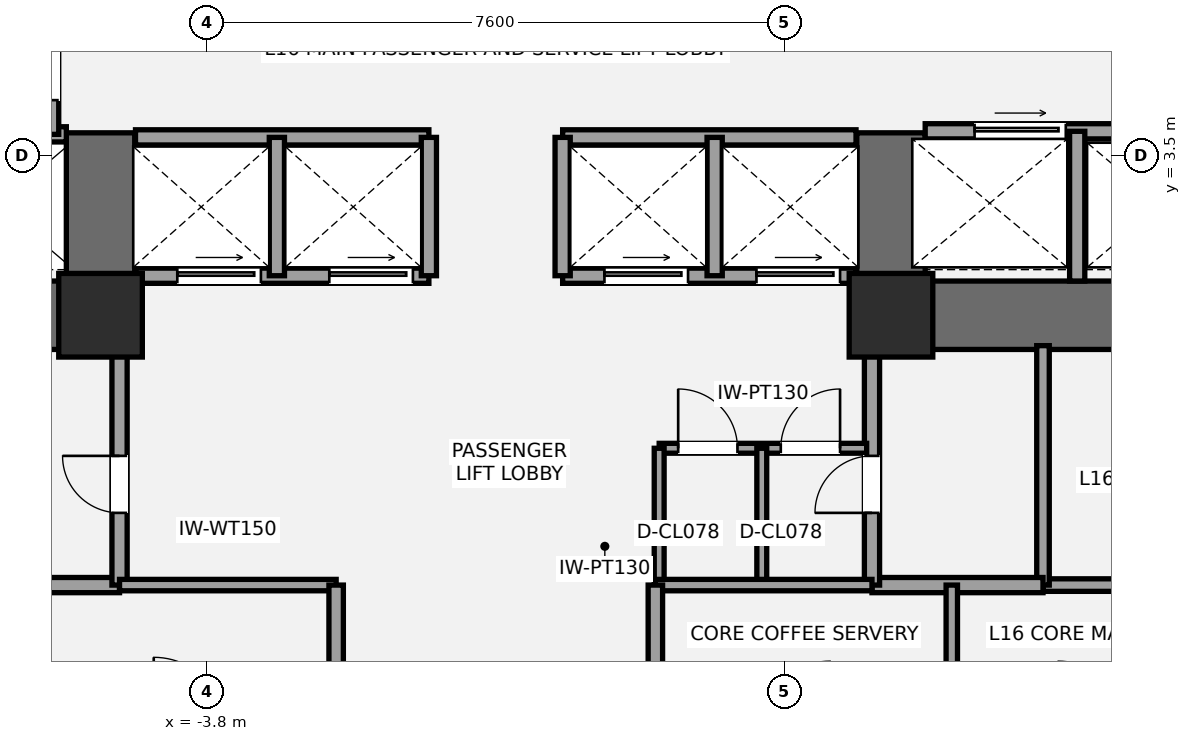
"""IFC4 building model, lengths in metres.
Left out: names, types, materials, properties, quantities, classifications, styles, units other than length and angle.
Written with IfcOpenShell. Run it as: python <this file> out.ifc"""

import sys

from ifc_helpers import new_model, si_unit, direction, frame, frame_2d, origin, origin_2d, place, context, subcontext, project, spatial, rectangle, extrude, element, fill, save


model = new_model("IFC4")
c1 = context("Model", 3, precision=1e-05, world=origin(), true_north=direction((0.0, 1.0)))
c2 = subcontext(c1, "Body", "Model", "MODEL_VIEW")
j1 = project(units=[si_unit("LENGTHUNIT", "METRE"), si_unit("PLANEANGLEUNIT", "RADIAN")], contexts=[c1])
p1 = place(None, origin())
s1 = spatial("IfcSite", under=j1, at=p1, CompositionType="ELEMENT")
p2 = place(p1, origin())
s2 = spatial("IfcBuilding", under=s1, at=p2, CompositionType="ELEMENT")
p3 = place(p2, frame((0.0, 0.0, 63.0)))
s3 = spatial("IfcBuildingStorey", under=s2, at=p3, CompositionType="ELEMENT", Elevation=63.0)
p4 = place(p3, frame((-4.75, 1.4, 0.0), z_axis=(0.0, 0.0, 1.0), x_axis=(-1.0, 0.0, 0.0)))
e1 = element("IfcWall", 1, at=p4, inside=s3, PredefinedType="SHEAR", context=c2, shape_type="SweptSolid", body=[
    extrude(rectangle(XDim=9.3, YDim=0.9, at=frame_2d((4.65, 0.0))), origin(), (0.0, 0.0, 1.0), 3.6),
])
p5 = place(p4, frame((5.55, 0.0, 0.0)))
e2 = element("IfcOpeningElement", 2, at=p5, cuts=e1, PredefinedType="OPENING", context=c2, shape_type="SweptSolid", body=[
    extrude(rectangle(XDim=1.05, YDim=2.15, at=frame_2d((0.525, 1.075))), frame((0.0, 0.46, 0.0), z_axis=(0.0, -1.0, 0.0), x_axis=(1.0, 0.0, 0.0)), (0.0, 0.0, 1.0), 0.92),
])
p6 = place(p4, frame((3.88, 0.0, 0.0)))
e3 = element("IfcOpeningElement", 3, at=p6, cuts=e1, PredefinedType="OPENING", context=c2, shape_type="SweptSolid", body=[
    extrude(rectangle(XDim=1.1, YDim=2.2, at=frame_2d((0.55, 1.1))), frame((0.0, 0.46, 0.0), z_axis=(0.0, -1.0, 0.0), x_axis=(1.0, 0.0, 0.0)), (0.0, 0.0, 1.0), 0.92),
])
p7 = place(p3, frame((-5.2, 0.95, 0.0), z_axis=(0.0, 0.0, 1.0), x_axis=(0.0, 1.0, 0.0)))
e4 = element("IfcWall", 4, at=p7, inside=s3, PredefinedType="SHEAR", context=c2, shape_type="SweptSolid", body=[
    extrude(rectangle(XDim=2.85, YDim=0.9, at=frame_2d((1.425, 0.0))), origin(), (0.0, 0.0, 1.0), 3.6),
])
p8 = place(p3, frame((14.05, 1.4, 0.0), z_axis=(0.0, 0.0, 1.0), x_axis=(-1.0, 0.0, 0.0)))
e5 = element("IfcWall", 5, at=p8, inside=s3, PredefinedType="SHEAR", context=c2, shape_type="SweptSolid", body=[
    extrude(rectangle(XDim=9.3, YDim=0.9, at=frame_2d((4.65, 0.0))), origin(), (0.0, 0.0, 1.0), 3.6),
])
p9 = place(p8, frame((2.7, 0.0, 0.0)))
e6 = element("IfcOpeningElement", 6, at=p9, cuts=e5, PredefinedType="OPENING", context=c2, shape_type="SweptSolid", body=[
    extrude(rectangle(XDim=1.05, YDim=2.15, at=frame_2d((0.525, 1.075))), frame((0.0, 0.46, 0.0), z_axis=(0.0, -1.0, 0.0), x_axis=(1.0, 0.0, 0.0)), (0.0, 0.0, 1.0), 0.92),
])
p10 = place(p8, frame((4.7, 0.0, 0.0)))
e7 = element("IfcOpeningElement", 7, at=p10, cuts=e5, PredefinedType="OPENING", context=c2, shape_type="SweptSolid", body=[
    extrude(rectangle(XDim=1.1, YDim=2.2, at=frame_2d((0.55, 1.1))), frame((0.0, 0.46, 0.0), z_axis=(0.0, -1.0, 0.0), x_axis=(1.0, 0.0, 0.0)), (0.0, 0.0, 1.0), 0.92),
])
p11 = place(p3, frame((5.2, 0.95, 0.0), z_axis=(0.0, 0.0, 1.0), x_axis=(0.0, 1.0, 0.0)))
e8 = element("IfcWall", 8, at=p11, inside=s3, PredefinedType="SHEAR", context=c2, shape_type="SweptSolid", body=[
    extrude(rectangle(XDim=2.85, YDim=0.9, at=frame_2d((1.425, 0.0))), origin(), (0.0, 0.0, 1.0), 3.6),
])
for number, where, z_axis, x_axis in (
    (9, (-5.2, 1.4, 0.0), (0.0, 0.0, 1.0), (1.0, 0.0, 0.0)),
    (10, (5.2, 1.4, 0.0), (0.0, 0.0, 1.0), (1.0, 0.0, 0.0)),
):
    element("IfcColumn", number, at=place(p3, frame(where, z_axis=z_axis, x_axis=x_axis)), inside=s3, PredefinedType="COLUMN", context=c2, shape_type="SweptSolid", body=[
        extrude(rectangle(XDim=1.1, YDim=1.1, at=origin_2d()), origin(), (0.0, 0.0, 1.0), 3.6),
    ])
p12 = place(p3, frame((-7.2, -2.15, 0.0), z_axis=(0.0, 0.0, 1.0), x_axis=(1.0, 0.0, 0.0)))
e11 = element("IfcWall", 11, at=p12, inside=s3, PredefinedType="SOLIDWALL", context=c2, shape_type="SweptSolid", body=[
    extrude(rectangle(XDim=2.25, YDim=0.2, at=frame_2d((1.125, 0.0))), origin(), (0.0, 0.0, 1.0), 3.4),
])
p13 = place(p3, frame((-4.95, -2.15, 0.0), z_axis=(0.0, 0.0, 1.0), x_axis=(0.0, 1.0, 0.0)))
e12 = element("IfcWall", 12, at=p13, inside=s3, PredefinedType="SOLIDWALL", context=c2, shape_type="SweptSolid", body=[
    extrude(rectangle(XDim=3.15, YDim=0.2, at=frame_2d((1.575, 0.0))), origin(), (0.0, 0.0, 1.0), 2.853),
])
p14 = place(p13, frame((0.95, 0.0, 0.0)))
e13 = element("IfcOpeningElement", 13, at=p14, cuts=e12, PredefinedType="OPENING", context=c2, shape_type="SweptSolid", body=[
    extrude(rectangle(XDim=0.75, YDim=2.1, at=frame_2d((0.375, 1.05))), frame((0.0, 0.11, 0.0), z_axis=(0.0, -1.0, 0.0), x_axis=(1.0, 0.0, 0.0)), (0.0, 0.0, 1.0), 0.22),
])
p15 = place(p3, frame((7.2, -2.15, 0.0), z_axis=(0.0, 0.0, 1.0), x_axis=(1.0, 0.0, 0.0)))
e14 = element("IfcWall", 14, at=p15, inside=s3, PredefinedType="PARTITIONING", context=c2, shape_type="SweptSolid", body=[
    extrude(rectangle(XDim=6.25, YDim=0.165, at=frame_2d((3.125, 0.0))), origin(), (0.0, 0.0, 1.0), 3.4),
])
p16 = place(p3, frame((7.2, -2.15, 0.0), z_axis=(0.0, 0.0, 1.0), x_axis=(0.0, 1.0, 0.0)))
e15 = element("IfcWall", 15, at=p16, inside=s3, PredefinedType="PARTITIONING", context=c2, shape_type="SweptSolid", body=[
    extrude(rectangle(XDim=3.15, YDim=0.165, at=frame_2d((1.575, 0.0))), origin(), (0.0, 0.0, 1.0), 2.853),
])
p17 = place(p3, frame((4.95, -2.15, 0.0), z_axis=(0.0, 0.0, 1.0), x_axis=(1.0, 0.0, 0.0)))
e16 = element("IfcWall", 16, at=p17, inside=s3, PredefinedType="SOLIDWALL", context=c2, shape_type="SweptSolid", body=[
    extrude(rectangle(XDim=2.25, YDim=0.2, at=frame_2d((1.125, 0.0))), origin(), (0.0, 0.0, 1.0), 3.4),
])
p18 = place(p3, frame((4.95, -2.15, 0.0), z_axis=(0.0, 0.0, 1.0), x_axis=(0.0, 1.0, 0.0)))
e17 = element("IfcWall", 17, at=p18, inside=s3, PredefinedType="SOLIDWALL", context=c2, shape_type="SweptSolid", body=[
    extrude(rectangle(XDim=3.15, YDim=0.2, at=frame_2d((1.575, 0.0))), origin(), (0.0, 0.0, 1.0), 2.853),
])
p19 = place(p18, frame((0.95, 0.0, 0.0)))
e18 = element("IfcOpeningElement", 18, at=p19, cuts=e17, PredefinedType="OPENING", context=c2, shape_type="SweptSolid", body=[
    extrude(rectangle(XDim=0.75, YDim=2.1, at=frame_2d((0.375, 1.05))), frame((0.0, 0.11, 0.0), z_axis=(0.0, -1.0, 0.0), x_axis=(1.0, 0.0, 0.0)), (0.0, 0.0, 1.0), 0.22),
])
p20 = place(p3, frame((2.15, -0.35, 0.0), z_axis=(0.0, 0.0, 1.0), x_axis=(1.0, 0.0, 0.0)))
e19 = element("IfcWall", 19, at=p20, inside=s3, PredefinedType="PARTITIONING", context=c2, shape_type="SweptSolid", body=[
    extrude(rectangle(XDim=2.73, YDim=0.13, at=frame_2d((1.365, 0.0))), origin(), (0.0, 0.0, 1.0), 3.4),
])
p21 = place(p20, frame((0.25, 0.0, 0.0)))
e20 = element("IfcOpeningElement", 20, at=p21, cuts=e19, PredefinedType="OPENING", context=c2, shape_type="SweptSolid", body=[
    extrude(rectangle(XDim=0.78, YDim=2.1, at=frame_2d((0.39, 1.05))), frame((0.0, 0.075, 0.0), z_axis=(0.0, -1.0, 0.0), x_axis=(1.0, 0.0, 0.0)), (0.0, 0.0, 1.0), 0.15),
])
p22 = place(p20, frame((1.6, 0.0, 0.0)))
e21 = element("IfcOpeningElement", 21, at=p22, cuts=e19, PredefinedType="OPENING", context=c2, shape_type="SweptSolid", body=[
    extrude(rectangle(XDim=0.78, YDim=2.1, at=frame_2d((0.39, 1.05))), frame((0.0, 0.075, 0.0), z_axis=(0.0, -1.0, 0.0), x_axis=(1.0, 0.0, 0.0)), (0.0, 0.0, 1.0), 0.15),
])
for number, where, z_axis, x_axis in (
    (22, (2.15, -2.15, 0.0), (0.0, 0.0, 1.0), (0.0, 1.0, 0.0)),
    (23, (3.5, -2.15, 0.0), (0.0, 0.0, 1.0), (0.0, 1.0, 0.0)),
):
    element("IfcWall", number, at=place(p3, frame(where, z_axis=z_axis, x_axis=x_axis)), inside=s3, PredefinedType="PARTITIONING", context=c2, shape_type="SweptSolid", body=[
        extrude(rectangle(XDim=1.8, YDim=0.13, at=frame_2d((0.9, 0.0))), origin(), (0.0, 0.0, 1.0), 3.4),
    ])
p23 = place(p3, frame((-9.78, 3.78, 0.0), z_axis=(0.0, 0.0, 1.0), x_axis=(1.0, 0.0, 0.0)))
e24 = element("IfcWall", 24, at=p23, inside=s3, PredefinedType="SOLIDWALL", context=c2, shape_type="SweptSolid", body=[
    extrude(rectangle(XDim=4.13, YDim=0.2, at=frame_2d((2.065, 0.0))), origin(), (0.0, 0.0, 1.0), 3.4),
])
p24 = place(p3, frame((-5.85, 3.78, 0.0), z_axis=(0.0, 0.0, 1.0), x_axis=(0.0, 1.0, 0.0)))
e25 = element("IfcWall", 25, at=p24, inside=s3, PredefinedType="SOLIDWALL", context=c2, shape_type="SweptSolid", body=[
    extrude(rectangle(XDim=1.69, YDim=0.2, at=frame_2d((0.845, 0.0))), origin(), (0.0, 0.0, 1.0), 3.4),
])
p25 = place(p24, frame((0.45, 0.0, 0.0)))
e26 = element("IfcOpeningElement", 26, at=p25, cuts=e25, PredefinedType="OPENING", context=c2, shape_type="SweptSolid", body=[
    extrude(rectangle(XDim=0.75, YDim=2.1, at=frame_2d((0.375, 1.05))), frame((0.0, 0.11, 0.0), z_axis=(0.0, -1.0, 0.0), x_axis=(1.0, 0.0, 0.0)), (0.0, 0.0, 1.0), 0.22),
])
p26 = place(p3, frame((5.65, 3.82, 0.0), z_axis=(0.0, 0.0, 1.0), x_axis=(1.0, 0.0, 0.0)))
e27 = element("IfcWall", 27, at=p26, inside=s3, PredefinedType="SOLIDWALL", context=c2, shape_type="SweptSolid", body=[
    extrude(rectangle(XDim=4.13, YDim=0.2, at=frame_2d((2.065, 0.0))), origin(), (0.0, 0.0, 1.0), 3.4),
])
p27 = place(p26, frame((0.65, 0.0, 0.0)))
e28 = element("IfcOpeningElement", 28, at=p27, cuts=e27, PredefinedType="OPENING", context=c2, shape_type="SweptSolid", body=[
    extrude(rectangle(XDim=1.2, YDim=2.2, at=frame_2d((0.6, 1.1))), frame((0.0, 0.11, 0.0), z_axis=(0.0, -1.0, 0.0), x_axis=(1.0, 0.0, 0.0)), (0.0, 0.0, 1.0), 0.22),
])
p28 = place(p3, frame((7.65, 1.85, 0.0), z_axis=(0.0, 0.0, 1.0), x_axis=(0.0, 1.0, 0.0)))
e29 = element("IfcWall", 29, at=p28, inside=s3, PredefinedType="SOLIDWALL", context=c2, shape_type="SweptSolid", body=[
    extrude(rectangle(XDim=1.97, YDim=0.2, at=frame_2d((0.985, 0.0))), origin(), (0.0, 0.0, 1.0), 3.4),
])
p29 = place(p3, frame((-4.74, 1.92, 0.0), z_axis=(0.0, 0.0, 1.0), x_axis=(1.0, 0.0, 0.0)))
e30 = element("IfcWall", 30, at=p29, inside=s3, PredefinedType="SOLIDWALL", context=c2, shape_type="SweptSolid", body=[
    extrude(rectangle(XDim=3.86, YDim=0.2, at=frame_2d((1.93, 0.0))), origin(), (0.0, 0.0, 1.0), 2.39),
])
p30 = place(p29, frame((0.55, 0.0, 0.0)))
e31 = element("IfcOpeningElement", 31, at=p30, cuts=e30, PredefinedType="OPENING", context=c2, shape_type="SweptSolid", body=[
    extrude(rectangle(XDim=1.1, YDim=2.2, at=frame_2d((0.55, 1.1))), frame((0.0, 0.11, 0.0), z_axis=(0.0, -1.0, 0.0), x_axis=(1.0, 0.0, 0.0)), (0.0, 0.0, 1.0), 0.22),
])
p31 = place(p29, frame((2.55, 0.0, 0.0)))
e32 = element("IfcOpeningElement", 32, at=p31, cuts=e30, PredefinedType="OPENING", context=c2, shape_type="SweptSolid", body=[
    extrude(rectangle(XDim=1.1, YDim=2.2, at=frame_2d((0.55, 1.1))), frame((0.0, 0.11, 0.0), z_axis=(0.0, -1.0, 0.0), x_axis=(1.0, 0.0, 0.0)), (0.0, 0.0, 1.0), 0.22),
])
p32 = place(p3, frame((0.88, 1.92, 0.0), z_axis=(0.0, 0.0, 1.0), x_axis=(1.0, 0.0, 0.0)))
e33 = element("IfcWall", 33, at=p32, inside=s3, PredefinedType="SOLIDWALL", context=c2, shape_type="SweptSolid", body=[
    extrude(rectangle(XDim=3.86, YDim=0.2, at=frame_2d((1.93, 0.0))), origin(), (0.0, 0.0, 1.0), 2.39),
])
p33 = place(p32, frame((0.55, 0.0, 0.0)))
e34 = element("IfcOpeningElement", 34, at=p33, cuts=e33, PredefinedType="OPENING", context=c2, shape_type="SweptSolid", body=[
    extrude(rectangle(XDim=1.1, YDim=2.2, at=frame_2d((0.55, 1.1))), frame((0.0, 0.11, 0.0), z_axis=(0.0, -1.0, 0.0), x_axis=(1.0, 0.0, 0.0)), (0.0, 0.0, 1.0), 0.22),
])
p34 = place(p32, frame((2.55, 0.0, 0.0)))
e35 = element("IfcOpeningElement", 35, at=p34, cuts=e33, PredefinedType="OPENING", context=c2, shape_type="SweptSolid", body=[
    extrude(rectangle(XDim=1.1, YDim=2.2, at=frame_2d((0.55, 1.1))), frame((0.0, 0.11, 0.0), z_axis=(0.0, -1.0, 0.0), x_axis=(1.0, 0.0, 0.0)), (0.0, 0.0, 1.0), 0.22),
])
for number, where, z_axis, x_axis in (
    (36, (-4.74, 3.74, 0.0), (0.0, 0.0, 1.0), (1.0, 0.0, 0.0)),
    (37, (0.88, 3.74, 0.0), (0.0, 0.0, 1.0), (1.0, 0.0, 0.0)),
):
    element("IfcWall", number, at=place(p3, frame(where, z_axis=z_axis, x_axis=x_axis)), inside=s3, PredefinedType="SOLIDWALL", context=c2, shape_type="SweptSolid", body=[
        extrude(rectangle(XDim=3.86, YDim=0.2, at=frame_2d((1.93, 0.0))), origin(), (0.0, 0.0, 1.0), 3.4),
    ])
for number, where, z_axis, x_axis in (
    (38, (-2.88, 1.92, 0.0), (0.0, 0.0, 1.0), (0.0, 1.0, 0.0)),
    (39, (2.88, 1.92, 0.0), (0.0, 0.0, 1.0), (0.0, 1.0, 0.0)),
    (40, (-0.88, 1.92, 0.0), (0.0, 0.0, 1.0), (0.0, 1.0, 0.0)),
    (41, (0.88, 1.92, 0.0), (0.0, 0.0, 1.0), (0.0, 1.0, 0.0)),
):
    element("IfcWall", number, at=place(p3, frame(where, z_axis=z_axis, x_axis=x_axis)), inside=s3, PredefinedType="SOLIDWALL", context=c2, shape_type="SweptSolid", body=[
        extrude(rectangle(XDim=1.82, YDim=0.2, at=frame_2d((0.91, 0.0))), origin(), (0.0, 0.0, 1.0), 3.4),
    ])
p35 = place(p3, frame((-4.95, -2.15, 0.0), z_axis=(0.0, 0.0, 1.0), x_axis=(1.0, 0.0, 0.0)))
e42 = element("IfcWall", 42, at=p35, inside=s3, PredefinedType="PLUMBINGWALL", context=c2, shape_type="SweptSolid", body=[
    extrude(rectangle(XDim=2.85, YDim=0.15, at=frame_2d((1.425, 0.0))), origin(), (0.0, 0.0, 1.0), 3.4),
])
p36 = place(p3, frame((-2.1, -4.05, 0.0), z_axis=(0.0, 0.0, 1.0), x_axis=(0.0, 1.0, 0.0)))
e43 = element("IfcWall", 43, at=p36, inside=s3, PredefinedType="PLUMBINGWALL", context=c2, shape_type="SweptSolid", body=[
    extrude(rectangle(XDim=1.9, YDim=0.19, at=frame_2d((0.95, 0.0))), origin(), (0.0, 0.0, 1.0), 3.4),
])
p37 = place(p3, frame((2.1, -2.15, 0.0), z_axis=(0.0, 0.0, 1.0), x_axis=(1.0, 0.0, 0.0)))
e44 = element("IfcWall", 44, at=p37, inside=s3, PredefinedType="PLUMBINGWALL", context=c2, shape_type="SweptSolid", body=[
    extrude(rectangle(XDim=2.85, YDim=0.15, at=frame_2d((1.425, 0.0))), origin(), (0.0, 0.0, 1.0), 3.4),
])
p38 = place(p3, frame((2.1, -4.05, 0.0), z_axis=(0.0, 0.0, 1.0), x_axis=(0.0, 1.0, 0.0)))
e45 = element("IfcWall", 45, at=p38, inside=s3, PredefinedType="PLUMBINGWALL", context=c2, shape_type="SweptSolid", body=[
    extrude(rectangle(XDim=1.9, YDim=0.19, at=frame_2d((0.95, 0.0))), origin(), (0.0, 0.0, 1.0), 3.4),
])
p39 = place(p3, frame((6.0, -4.05, 0.0), z_axis=(0.0, 0.0, 1.0), x_axis=(0.0, 1.0, 0.0)))
e46 = element("IfcWall", 46, at=p39, inside=s3, PredefinedType="PLUMBINGWALL", context=c2, shape_type="SweptSolid", body=[
    extrude(rectangle(XDim=1.9, YDim=0.15, at=frame_2d((0.95, 0.0))), origin(), (0.0, 0.0, 1.0), 2.841),
])
p40 = place(p14, origin())
e47 = element("IfcDoor", 47, at=p40, inside=s3, OperationType="SINGLE_SWING_RIGHT", PredefinedType="DOOR", context=c2, shape_type="SweptSolid", body=[
    extrude(rectangle(XDim=0.75, YDim=2.1, at=frame_2d((0.375, 1.05))), frame((0.0, 0.025, 0.0), z_axis=(0.0, -1.0, 0.0), x_axis=(1.0, 0.0, 0.0)), (0.0, 0.0, 1.0), 0.05),
])
fill(e13, e47)
p41 = place(p19, origin())
e48 = element("IfcDoor", 48, at=p41, inside=s3, OperationType="SINGLE_SWING_LEFT", PredefinedType="DOOR", context=c2, shape_type="SweptSolid", body=[
    extrude(rectangle(XDim=0.75, YDim=2.1, at=frame_2d((0.375, 1.05))), frame((0.0, 0.025, 0.0), z_axis=(0.0, -1.0, 0.0), x_axis=(1.0, 0.0, 0.0)), (0.0, 0.0, 1.0), 0.05),
])
fill(e18, e48)
p42 = place(p21, origin())
e49 = element("IfcDoor", 49, at=p42, inside=s3, OperationType="SINGLE_SWING_LEFT", PredefinedType="DOOR", context=c2, shape_type="SweptSolid", body=[
    extrude(rectangle(XDim=0.78, YDim=2.1, at=frame_2d((0.39, 1.05))), frame((0.0, 0.025, 0.0), z_axis=(0.0, -1.0, 0.0), x_axis=(1.0, 0.0, 0.0)), (0.0, 0.0, 1.0), 0.05),
])
fill(e20, e49)
p43 = place(p22, origin())
e50 = element("IfcDoor", 50, at=p43, inside=s3, OperationType="SINGLE_SWING_RIGHT", PredefinedType="DOOR", context=c2, shape_type="SweptSolid", body=[
    extrude(rectangle(XDim=0.78, YDim=2.1, at=frame_2d((0.39, 1.05))), frame((0.0, 0.025, 0.0), z_axis=(0.0, -1.0, 0.0), x_axis=(1.0, 0.0, 0.0)), (0.0, 0.0, 1.0), 0.05),
])
fill(e21, e50)
p44 = place(p25, origin())
e51 = element("IfcDoor", 51, at=p44, inside=s3, OperationType="SINGLE_SWING_RIGHT", PredefinedType="DOOR", context=c2, shape_type="SweptSolid", body=[
    extrude(rectangle(XDim=0.75, YDim=2.1, at=frame_2d((0.375, 1.05))), frame((0.0, 0.025, 0.0), z_axis=(0.0, -1.0, 0.0), x_axis=(1.0, 0.0, 0.0)), (0.0, 0.0, 1.0), 0.05),
])
fill(e26, e51)
p45 = place(p27, origin())
e52 = element("IfcDoor", 52, at=p45, inside=s3, OperationType="SLIDING_TO_RIGHT", PredefinedType="DOOR", context=c2, shape_type="SweptSolid", body=[
    extrude(rectangle(XDim=1.2, YDim=2.2, at=frame_2d((0.6, 1.1))), frame((0.0, 0.025, 0.0), z_axis=(0.0, -1.0, 0.0), x_axis=(1.0, 0.0, 0.0)), (0.0, 0.0, 1.0), 0.05),
])
fill(e28, e52)
p46 = place(p30, origin())
e53 = element("IfcDoor", 53, at=p46, inside=s3, OperationType="SLIDING_TO_LEFT", PredefinedType="DOOR", context=c2, shape_type="SweptSolid", body=[
    extrude(rectangle(XDim=1.1, YDim=2.2, at=frame_2d((0.55, 1.1))), frame((0.0, 0.025, 0.0), z_axis=(0.0, -1.0, 0.0), x_axis=(1.0, 0.0, 0.0)), (0.0, 0.0, 1.0), 0.05),
])
fill(e31, e53)
p47 = place(p31, origin())
e54 = element("IfcDoor", 54, at=p47, inside=s3, OperationType="SLIDING_TO_LEFT", PredefinedType="DOOR", context=c2, shape_type="SweptSolid", body=[
    extrude(rectangle(XDim=1.1, YDim=2.2, at=frame_2d((0.55, 1.1))), frame((0.0, 0.025, 0.0), z_axis=(0.0, -1.0, 0.0), x_axis=(1.0, 0.0, 0.0)), (0.0, 0.0, 1.0), 0.05),
])
fill(e32, e54)
p48 = place(p33, origin())
e55 = element("IfcDoor", 55, at=p48, inside=s3, OperationType="SLIDING_TO_LEFT", PredefinedType="DOOR", context=c2, shape_type="SweptSolid", body=[
    extrude(rectangle(XDim=1.1, YDim=2.2, at=frame_2d((0.55, 1.1))), frame((0.0, 0.025, 0.0), z_axis=(0.0, -1.0, 0.0), x_axis=(1.0, 0.0, 0.0)), (0.0, 0.0, 1.0), 0.05),
])
fill(e34, e55)
p49 = place(p34, origin())
e56 = element("IfcDoor", 56, at=p49, inside=s3, OperationType="SLIDING_TO_LEFT", PredefinedType="DOOR", context=c2, shape_type="SweptSolid", body=[
    extrude(rectangle(XDim=1.1, YDim=2.2, at=frame_2d((0.55, 1.1))), frame((0.0, 0.025, 0.0), z_axis=(0.0, -1.0, 0.0), x_axis=(1.0, 0.0, 0.0)), (0.0, 0.0, 1.0), 0.05),
])
fill(e35, e56)
save(model, sys.argv[1])
